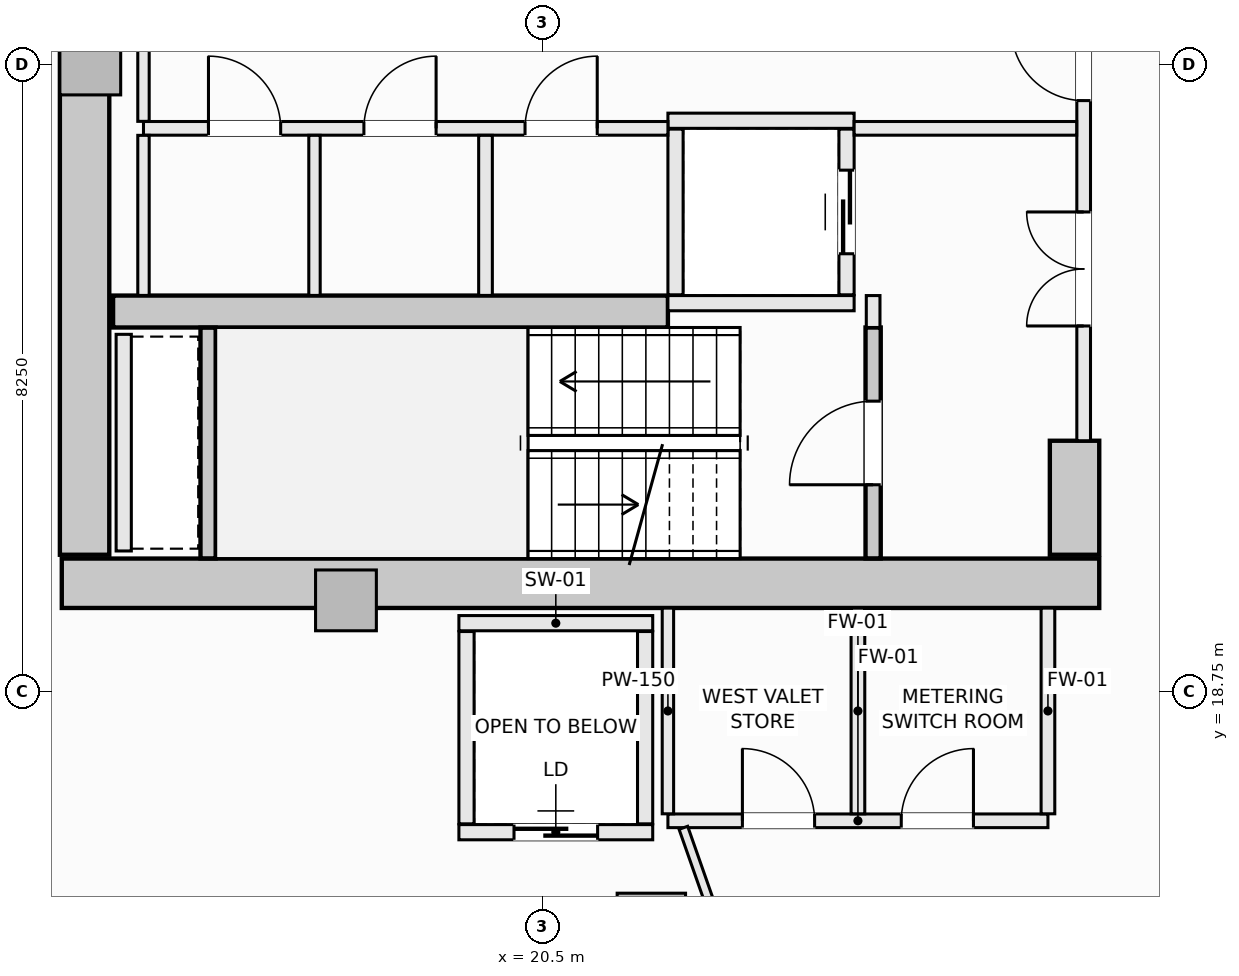
"""IFC4 building model, lengths in metres.
Left out: names, types, materials, properties, quantities, classifications, styles, units other than length and angle.
Written with IfcOpenShell. Run it as: python <this file> out.ifc"""

import sys

from ifc_helpers import new_model, si_unit, direction, frame, frame_2d, origin, origin_2d, place, context, subcontext, project, spatial, rectangle, extrude, element, fill, save


model = new_model("IFC4")
c1 = context("Model", 3, precision=1e-05, world=origin(), true_north=direction((0.0, 1.0)))
c2 = subcontext(c1, "Body", "Model", "MODEL_VIEW")
j1 = project(units=[si_unit("LENGTHUNIT", "METRE"), si_unit("PLANEANGLEUNIT", "RADIAN")], contexts=[c1])
p1 = place(None, origin())
s1 = spatial("IfcSite", under=j1, at=p1, CompositionType="ELEMENT")
p2 = place(p1, origin())
s2 = spatial("IfcBuilding", under=s1, at=p2, CompositionType="ELEMENT")
p3 = place(p2, frame((0.0, 0.0, 139.3)))
s3 = spatial("IfcBuildingStorey", under=s2, at=p3, CompositionType="ELEMENT", Elevation=139.3)
p4 = place(p3, frame((14.175, 20.175, -0.27), z_axis=(0.0, 0.0, 1.0), x_axis=(1.0, 0.0, 0.0)))
e1 = element("IfcWall", 1, at=p4, inside=s3, PredefinedType="SHEAR", context=c2, shape_type="SweptSolid", body=[
    extrude(rectangle(XDim=13.65, YDim=0.65, at=frame_2d((6.825, 0.0))), origin(), (0.0, 0.0, 1.0), 3.4),
])
p5 = place(p3, frame((14.475, 20.55, -0.27), z_axis=(0.0, 0.0, 1.0), x_axis=(0.0, 1.0, 0.0)))
e2 = element("IfcWall", 2, at=p5, inside=s3, PredefinedType="SHEAR", context=c2, shape_type="SweptSolid", body=[
    extrude(rectangle(XDim=12.9, YDim=0.65, at=frame_2d((6.45, 0.0))), origin(), (0.0, 0.0, 1.0), 3.4),
])
p6 = place(p3, frame((27.5, 20.55, -0.27), z_axis=(0.0, 0.0, 1.0), x_axis=(0.0, 1.0, 0.0)))
e3 = element("IfcWall", 3, at=p6, inside=s3, PredefinedType="SHEAR", context=c2, shape_type="SweptSolid", body=[
    extrude(rectangle(XDim=1.5, YDim=0.65, at=frame_2d((0.75, 0.0))), origin(), (0.0, 0.0, 1.0), 3.4),
])
p7 = place(p3, frame((14.85, 23.75, -0.27), z_axis=(0.0, 0.0, 1.0), x_axis=(1.0, 0.0, 0.0)))
e4 = element("IfcWall", 4, at=p7, inside=s3, PredefinedType="SHEAR", context=c2, shape_type="SweptSolid", body=[
    extrude(rectangle(XDim=7.3, YDim=0.42, at=frame_2d((3.65, 0.0))), origin(), (0.0, 0.0, 1.0), 3.4),
])
p8 = place(p3, frame((21.932, 15.648, -0.27), z_axis=(0.0, 0.0, 1.0), x_axis=(1.0, 0.0, 0.0)))
e5 = element("IfcColumn", 5, at=p8, inside=s3, PredefinedType="COLUMN", context=c2, shape_type="SweptSolid", body=[
    extrude(rectangle(XDim=0.9, YDim=0.9, at=origin_2d()), origin(), (0.0, 0.0, 1.0), 3.4),
])
for number, where, z_axis, x_axis in (
    (6, (14.55, 27.0, -0.27), (0.0, 0.0, 1.0), (1.0, 0.0, 0.0)),
    (7, (17.914, 19.95, -0.27), (0.0, 0.0, 1.0), (1.0, 0.0, 0.0)),
):
    element("IfcColumn", number, at=place(p3, frame(where, z_axis=z_axis, x_axis=x_axis)), inside=s3, PredefinedType="PILASTER", context=c2, shape_type="SweptSolid", body=[
        extrude(rectangle(XDim=0.8, YDim=0.8, at=origin_2d()), origin(), (0.0, 0.0, 1.0), 3.4),
    ])
p9 = place(p3, frame((9.178, 17.325, 0.0), z_axis=(0.0, 0.0, 1.0), x_axis=(0.901370184739, -0.433049408339, 0.0)))
e8 = element("IfcWall", 8, at=p9, inside=s3, PredefinedType="SOLIDWALL", context=c2, shape_type="SweptSolid", body=[
    extrude(rectangle(XDim=5.884, YDim=0.3, at=frame_2d((2.942, 0.0))), origin(), (0.0, 0.0, 1.0), 2.653),
])
p10 = place(p9, frame((1.892, 0.0, 0.74)))
e9 = element("IfcOpeningElement", 9, at=p10, cuts=e8, PredefinedType="OPENING", context=c2, shape_type="SweptSolid", body=[
    extrude(rectangle(XDim=2.1, YDim=1.7, at=frame_2d((1.05, 0.85))), frame((0.0, 0.16, 0.0), z_axis=(0.0, -1.0, 0.0), x_axis=(1.0, 0.0, 0.0)), (0.0, 0.0, 1.0), 0.32),
])
p11 = place(p3, frame((24.85, 20.502, -0.27), z_axis=(0.0, 0.0, 1.0), x_axis=(0.0, 1.0, 0.0)))
e10 = element("IfcWall", 10, at=p11, inside=s3, PredefinedType="SHEAR", context=c2, shape_type="SweptSolid", body=[
    extrude(rectangle(XDim=3.038, YDim=0.2, at=frame_2d((1.519, 0.0))), origin(), (0.0, 0.0, 1.0), 3.4),
])
p12 = place(p11, frame((0.969, 0.0, 0.27)))
e11 = element("IfcOpeningElement", 11, at=p12, cuts=e10, PredefinedType="OPENING", context=c2, shape_type="SweptSolid", body=[
    extrude(rectangle(XDim=1.1, YDim=2.15, at=frame_2d((0.55, 1.075))), frame((0.0, 0.11, 0.0), z_axis=(0.0, -1.0, 0.0), x_axis=(1.0, 0.0, 0.0)), (0.0, 0.0, 1.0), 0.22),
])
p13 = place(p3, frame((16.1, 20.502, -0.27), z_axis=(0.0, 0.0, 1.0), x_axis=(0.0, 1.0, 0.0)))
e12 = element("IfcWall", 12, at=p13, inside=s3, PredefinedType="SHEAR", context=c2, shape_type="SweptSolid", body=[
    extrude(rectangle(XDim=3.036, YDim=0.2, at=frame_2d((1.518, 0.0))), origin(), (0.0, 0.0, 1.0), 3.4),
])
for number, where, z_axis, x_axis in (
    (13, (22.15, 26.26, 0.0), (0.0, 0.0, 1.0), (1.0, 0.0, 0.0)),
    (14, (22.15, 23.86, 0.0), (0.0, 0.0, 1.0), (1.0, 0.0, 0.0)),
):
    element("IfcWall", number, at=place(p3, frame(where, z_axis=z_axis, x_axis=x_axis)), inside=s3, PredefinedType="SOLIDWALL", context=c2, shape_type="SweptSolid", body=[
        extrude(rectangle(XDim=2.45, YDim=0.2, at=frame_2d((1.225, 0.0))), origin(), (0.0, 0.0, 1.0), 3.13),
    ])
p14 = place(p3, frame((22.25, 23.97, 0.0), z_axis=(0.0, 0.0, 1.0), x_axis=(0.0, 1.0, 0.0)))
e15 = element("IfcWall", 15, at=p14, inside=s3, PredefinedType="SOLIDWALL", context=c2, shape_type="SweptSolid", body=[
    extrude(rectangle(XDim=2.18, YDim=0.2, at=frame_2d((1.09, 0.0))), origin(), (0.0, 0.0, 1.0), 3.13),
])
p15 = place(p3, frame((24.5, 23.97, 0.0), z_axis=(0.0, 0.0, 1.0), x_axis=(0.0, 1.0, 0.0)))
e16 = element("IfcWall", 16, at=p15, inside=s3, PredefinedType="SOLIDWALL", context=c2, shape_type="SweptSolid", body=[
    extrude(rectangle(XDim=2.18, YDim=0.2, at=frame_2d((1.09, 0.0))), origin(), (0.0, 0.0, 1.0), 3.13),
])
p16 = place(p15, frame((0.54, 0.0, 0.0)))
e17 = element("IfcOpeningElement", 17, at=p16, cuts=e16, PredefinedType="OPENING", context=c2, shape_type="SweptSolid", body=[
    extrude(rectangle(XDim=1.1, YDim=2.2, at=frame_2d((0.55, 1.1))), frame((0.0, 0.11, 0.0), z_axis=(0.0, -1.0, 0.0), x_axis=(1.0, 0.0, 0.0)), (0.0, 0.0, 1.0), 0.22),
])
p17 = place(p3, frame((19.4, 19.65, 0.0), z_axis=(0.0, 0.0, 1.0), x_axis=(1.0, 0.0, 0.0)))
e18 = element("IfcWall", 18, at=p17, inside=s3, PredefinedType="SOLIDWALL", context=c2, shape_type="SweptSolid", body=[
    extrude(rectangle(XDim=2.55, YDim=0.2, at=frame_2d((1.275, 0.0))), origin(), (0.0, 0.0, 1.0), 3.13),
])
p18 = place(p3, frame((19.4, 16.9, 0.0), z_axis=(0.0, 0.0, 1.0), x_axis=(1.0, 0.0, 0.0)))
e19 = element("IfcWall", 19, at=p18, inside=s3, PredefinedType="SOLIDWALL", context=c2, shape_type="SweptSolid", body=[
    extrude(rectangle(XDim=2.55, YDim=0.2, at=frame_2d((1.275, 0.0))), origin(), (0.0, 0.0, 1.0), 3.13),
])
p19 = place(p18, frame((0.725, 0.0, 0.0)))
e20 = element("IfcOpeningElement", 20, at=p19, cuts=e19, PredefinedType="OPENING", context=c2, shape_type="SweptSolid", body=[
    extrude(rectangle(XDim=1.1, YDim=2.2, at=frame_2d((0.55, 1.1))), frame((0.0, 0.11, 0.0), z_axis=(0.0, -1.0, 0.0), x_axis=(1.0, 0.0, 0.0)), (0.0, 0.0, 1.0), 0.22),
])
for number, where, z_axis, x_axis in (
    (21, (19.5, 17.01, 0.0), (0.0, 0.0, 1.0), (0.0, 1.0, 0.0)),
    (22, (21.85, 17.01, 0.0), (0.0, 0.0, 1.0), (0.0, 1.0, 0.0)),
):
    element("IfcWall", number, at=place(p3, frame(where, z_axis=z_axis, x_axis=x_axis)), inside=s3, PredefinedType="SOLIDWALL", context=c2, shape_type="SweptSolid", body=[
        extrude(rectangle(XDim=2.53, YDim=0.2, at=frame_2d((1.265, 0.0))), origin(), (0.0, 0.0, 1.0), 3.13),
    ])
p20 = place(p3, frame((14.99, 20.6, 0.0), z_axis=(0.0, 0.0, 1.0), x_axis=(0.0, 1.0, 0.0)))
e23 = element("IfcWall", 23, at=p20, inside=s3, PredefinedType="SOLIDWALL", context=c2, shape_type="SweptSolid", body=[
    extrude(rectangle(XDim=2.85, YDim=0.2, at=frame_2d((1.425, 0.0))), origin(), (0.0, 0.0, 1.0), 3.13),
])
p21 = place(p3, frame((24.85, 23.54, 0.0), z_axis=(0.0, 0.0, 1.0), x_axis=(0.0, 1.0, 0.0)))
e24 = element("IfcWall", 24, at=p21, inside=s3, PredefinedType="SOLIDWALL", context=c2, shape_type="SweptSolid", body=[
    extrude(rectangle(XDim=0.42, YDim=0.18, at=frame_2d((0.21, 0.0))), origin(), (0.0, 0.0, 1.0), 3.13),
])
p22 = place(p3, frame((27.62, 22.05, 0.0), z_axis=(0.0, 0.0, 1.0), x_axis=(0.0, 1.0, 0.0)))
e25 = element("IfcWall", 25, at=p22, inside=s3, PredefinedType="SOLIDWALL", context=c2, shape_type="SweptSolid", body=[
    extrude(rectangle(XDim=9.9, YDim=0.18, at=frame_2d((4.95, 0.0))), origin(), (0.0, 0.0, 1.0), 3.13),
])
p23 = place(p22, frame((4.475, 0.0, 0.0)))
e26 = element("IfcOpeningElement", 26, at=p23, cuts=e25, PredefinedType="OPENING", context=c2, shape_type="SweptSolid", body=[
    extrude(rectangle(XDim=0.95, YDim=2.1, at=frame_2d((0.475, 1.05))), frame((0.0, 0.1, 0.0), z_axis=(0.0, -1.0, 0.0), x_axis=(1.0, 0.0, 0.0)), (0.0, 0.0, 1.0), 0.2),
])
p24 = place(p22, frame((6.89, 0.0, 0.0)))
e27 = element("IfcOpeningElement", 27, at=p24, cuts=e25, PredefinedType="OPENING", context=c2, shape_type="SweptSolid", body=[
    extrude(rectangle(XDim=1.5, YDim=2.2, at=frame_2d((0.75, 1.1))), frame((0.0, 0.1, 0.0), z_axis=(0.0, -1.0, 0.0), x_axis=(1.0, 0.0, 0.0)), (0.0, 0.0, 1.0), 0.2),
])
p25 = place(p22, frame((1.51, 0.0, 0.0)))
e28 = element("IfcOpeningElement", 28, at=p25, cuts=e25, PredefinedType="OPENING", context=c2, shape_type="SweptSolid", body=[
    extrude(rectangle(XDim=1.5, YDim=2.2, at=frame_2d((0.75, 1.1))), frame((0.0, 0.1, 0.0), z_axis=(0.0, -1.0, 0.0), x_axis=(1.0, 0.0, 0.0)), (0.0, 0.0, 1.0), 0.2),
])
p26 = place(p3, frame((15.25, 26.16, 0.0), z_axis=(0.0, 0.0, 1.0), x_axis=(1.0, 0.0, 0.0)))
e29 = element("IfcWall", 29, at=p26, inside=s3, PredefinedType="SOLIDWALL", context=c2, shape_type="SweptSolid", body=[
    extrude(rectangle(XDim=6.9, YDim=0.18, at=frame_2d((3.45, 0.0))), origin(), (0.0, 0.0, 1.0), 3.13),
])
p27 = place(p26, frame((5.02, 0.0, 0.0)))
e30 = element("IfcOpeningElement", 30, at=p27, cuts=e29, PredefinedType="OPENING", context=c2, shape_type="SweptSolid", body=[
    extrude(rectangle(XDim=0.95, YDim=2.1, at=frame_2d((0.475, 1.05))), frame((0.0, 0.1, 0.0), z_axis=(0.0, -1.0, 0.0), x_axis=(1.0, 0.0, 0.0)), (0.0, 0.0, 1.0), 0.2),
])
p28 = place(p26, frame((0.855, 0.0, 0.0)))
e31 = element("IfcOpeningElement", 31, at=p28, cuts=e29, PredefinedType="OPENING", context=c2, shape_type="SweptSolid", body=[
    extrude(rectangle(XDim=0.95, YDim=2.1, at=frame_2d((0.475, 1.05))), frame((0.0, 0.1, 0.0), z_axis=(0.0, -1.0, 0.0), x_axis=(1.0, 0.0, 0.0)), (0.0, 0.0, 1.0), 0.2),
])
p29 = place(p26, frame((2.9, 0.0, 0.0)))
e32 = element("IfcOpeningElement", 32, at=p29, cuts=e29, PredefinedType="OPENING", context=c2, shape_type="SweptSolid", body=[
    extrude(rectangle(XDim=0.95, YDim=2.1, at=frame_2d((0.475, 1.05))), frame((0.0, 0.1, 0.0), z_axis=(0.0, -1.0, 0.0), x_axis=(1.0, 0.0, 0.0)), (0.0, 0.0, 1.0), 0.2),
])
p30 = place(p3, frame((24.6, 26.16, 0.0), z_axis=(0.0, 0.0, 1.0), x_axis=(1.0, 0.0, 0.0)))
e33 = element("IfcWall", 33, at=p30, inside=s3, PredefinedType="SOLIDWALL", context=c2, shape_type="SweptSolid", body=[
    extrude(rectangle(XDim=2.928, YDim=0.18, at=frame_2d((1.464, 0.0))), origin(), (0.0, 0.0, 1.0), 3.13),
])
p31 = place(p3, frame((15.25, 23.962, 0.0), z_axis=(0.0, 0.0, 1.0), x_axis=(0.0, 1.0, 0.0)))
e34 = element("IfcWall", 34, at=p31, inside=s3, PredefinedType="PARTITIONING", context=c2, shape_type="SweptSolid", body=[
    extrude(rectangle(XDim=2.106, YDim=0.15, at=frame_2d((1.053, 0.0))), origin(), (0.0, 0.0, 1.0), 3.13),
])
p32 = place(p3, frame((15.25, 26.252, 0.0), z_axis=(0.0, 0.0, 1.0), x_axis=(0.0, 1.0, 0.0)))
e35 = element("IfcWall", 35, at=p32, inside=s3, PredefinedType="PARTITIONING", context=c2, shape_type="SweptSolid", body=[
    extrude(rectangle(XDim=1.496, YDim=0.15, at=frame_2d((0.748, 0.0))), origin(), (0.0, 0.0, 1.0), 3.13),
])
p33 = place(p3, frame((19.75, 23.962, 0.0), z_axis=(0.0, 0.0, 1.0), x_axis=(0.0, 1.0, 0.0)))
e36 = element("IfcWall", 36, at=p33, inside=s3, PredefinedType="SOLIDWALL", context=c2, shape_type="SweptSolid", body=[
    extrude(rectangle(XDim=2.106, YDim=0.18, at=frame_2d((1.053, 0.0))), origin(), (0.0, 0.0, 1.0), 3.13),
])
p34 = place(p3, frame((17.5, 23.962, 0.0), z_axis=(0.0, 0.0, 1.0), x_axis=(0.0, 1.0, 0.0)))
e37 = element("IfcWall", 37, at=p34, inside=s3, PredefinedType="PARTITIONING", context=c2, shape_type="SweptSolid", body=[
    extrude(rectangle(XDim=2.106, YDim=0.15, at=frame_2d((1.053, 0.0))), origin(), (0.0, 0.0, 1.0), 3.13),
])
p35 = place(p3, frame((22.15, 17.05, 0.0), z_axis=(0.0, 0.0, 1.0), x_axis=(1.0, 0.0, 0.0)))
e38 = element("IfcWall", 38, at=p35, inside=s3, PredefinedType="SOLIDWALL", context=c2, shape_type="SweptSolid", body=[
    extrude(rectangle(XDim=5.0, YDim=0.18, at=frame_2d((2.5, 0.0))), origin(), (0.0, 0.0, 1.0), 3.13),
])
p36 = place(p35, frame((0.98, 0.0, 0.0)))
e39 = element("IfcOpeningElement", 39, at=p36, cuts=e38, PredefinedType="OPENING", context=c2, shape_type="SweptSolid", body=[
    extrude(rectangle(XDim=0.95, YDim=2.1, at=frame_2d((0.475, 1.05))), frame((0.0, 0.1, 0.0), z_axis=(0.0, -1.0, 0.0), x_axis=(1.0, 0.0, 0.0)), (0.0, 0.0, 1.0), 0.2),
])
p37 = place(p35, frame((3.07, 0.0, 0.0)))
e40 = element("IfcOpeningElement", 40, at=p37, cuts=e38, PredefinedType="OPENING", context=c2, shape_type="SweptSolid", body=[
    extrude(rectangle(XDim=0.95, YDim=2.1, at=frame_2d((0.475, 1.05))), frame((0.0, 0.1, 0.0), z_axis=(0.0, -1.0, 0.0), x_axis=(1.0, 0.0, 0.0)), (0.0, 0.0, 1.0), 0.2),
])
p38 = place(p3, frame((22.15, 17.142, 0.0), z_axis=(0.0, 0.0, 1.0), x_axis=(0.0, 1.0, 0.0)))
e41 = element("IfcWall", 41, at=p38, inside=s3, PredefinedType="PARTITIONING", context=c2, shape_type="SweptSolid", body=[
    extrude(rectangle(XDim=2.706, YDim=0.15, at=frame_2d((1.353, 0.0))), origin(), (0.0, 0.0, 1.0), 3.13),
])
for number, where, z_axis, x_axis in (
    (42, (24.65, 17.142, 0.0), (0.0, 0.0, 1.0), (0.0, 1.0, 0.0)),
    (43, (27.15, 17.142, 0.0), (0.0, 0.0, 1.0), (0.0, 1.0, 0.0)),
):
    element("IfcWall", number, at=place(p3, frame(where, z_axis=z_axis, x_axis=x_axis)), inside=s3, PredefinedType="SOLIDWALL", context=c2, shape_type="SweptSolid", body=[
        extrude(rectangle(XDim=2.706, YDim=0.18, at=frame_2d((1.353, 0.0))), origin(), (0.0, 0.0, 1.0), 3.13),
    ])
p39 = place(p3, frame((22.353, 16.958, 0.0), z_axis=(0.0, 0.0, 1.0), x_axis=(0.331370038458, -0.943500873138, 0.0)))
e44 = element("IfcWall", 44, at=p39, inside=s3, PredefinedType="PARTITIONING", context=c2, shape_type="SweptSolid", body=[
    extrude(rectangle(XDim=1.216, YDim=0.12, at=frame_2d((0.608, 0.0))), origin(), (0.0, 0.0, 1.0), 3.13),
])
p40 = place(p12, origin())
e45 = element("IfcDoor", 45, at=p40, inside=s3, OperationType="SINGLE_SWING_LEFT", PredefinedType="DOOR", context=c2, shape_type="SweptSolid", body=[
    extrude(rectangle(XDim=1.1, YDim=2.15, at=frame_2d((0.55, 1.075))), frame((0.0, 0.025, 0.0), z_axis=(0.0, -1.0, 0.0), x_axis=(1.0, 0.0, 0.0)), (0.0, 0.0, 1.0), 0.05),
])
fill(e11, e45)
p41 = place(p16, origin())
e46 = element("IfcDoor", 46, at=p41, inside=s3, OperationType="SLIDING_TO_LEFT", PredefinedType="DOOR", context=c2, shape_type="SweptSolid", body=[
    extrude(rectangle(XDim=1.1, YDim=2.2, at=frame_2d((0.55, 1.1))), frame((0.0, 0.025, 0.0), z_axis=(0.0, -1.0, 0.0), x_axis=(1.0, 0.0, 0.0)), (0.0, 0.0, 1.0), 0.05),
])
fill(e17, e46)
p42 = place(p19, origin())
e47 = element("IfcDoor", 47, at=p42, inside=s3, OperationType="SLIDING_TO_LEFT", PredefinedType="DOOR", context=c2, shape_type="SweptSolid", body=[
    extrude(rectangle(XDim=1.1, YDim=2.2, at=frame_2d((0.55, 1.1))), frame((0.0, 0.025, 0.0), z_axis=(0.0, -1.0, 0.0), x_axis=(1.0, 0.0, 0.0)), (0.0, 0.0, 1.0), 0.05),
])
fill(e20, e47)
p43 = place(p23, origin())
e48 = element("IfcDoor", 48, at=p43, inside=s3, OperationType="SINGLE_SWING_RIGHT", PredefinedType="DOOR", context=c2, shape_type="SweptSolid", body=[
    extrude(rectangle(XDim=0.95, YDim=2.1, at=frame_2d((0.475, 1.05))), frame((0.0, 0.025, 0.0), z_axis=(0.0, -1.0, 0.0), x_axis=(1.0, 0.0, 0.0)), (0.0, 0.0, 1.0), 0.05),
])
fill(e26, e48)
p44 = place(p25, origin())
e49 = element("IfcDoor", 49, at=p44, inside=s3, OperationType="DOUBLE_DOOR_SINGLE_SWING", PredefinedType="DOOR", context=c2, shape_type="SweptSolid", body=[
    extrude(rectangle(XDim=1.5, YDim=2.2, at=frame_2d((0.75, 1.1))), frame((0.0, 0.025, 0.0), z_axis=(0.0, -1.0, 0.0), x_axis=(1.0, 0.0, 0.0)), (0.0, 0.0, 1.0), 0.05),
])
fill(e28, e49)
p45 = place(p27, origin())
e50 = element("IfcDoor", 50, at=p45, inside=s3, OperationType="SINGLE_SWING_RIGHT", PredefinedType="DOOR", context=c2, shape_type="SweptSolid", body=[
    extrude(rectangle(XDim=0.95, YDim=2.1, at=frame_2d((0.475, 1.05))), frame((0.0, 0.025, 0.0), z_axis=(0.0, -1.0, 0.0), x_axis=(1.0, 0.0, 0.0)), (0.0, 0.0, 1.0), 0.05),
])
fill(e30, e50)
p46 = place(p28, origin())
e51 = element("IfcDoor", 51, at=p46, inside=s3, OperationType="SINGLE_SWING_LEFT", PredefinedType="DOOR", context=c2, shape_type="SweptSolid", body=[
    extrude(rectangle(XDim=0.95, YDim=2.1, at=frame_2d((0.475, 1.05))), frame((0.0, 0.025, 0.0), z_axis=(0.0, -1.0, 0.0), x_axis=(1.0, 0.0, 0.0)), (0.0, 0.0, 1.0), 0.05),
])
fill(e31, e51)
p47 = place(p29, origin())
e52 = element("IfcDoor", 52, at=p47, inside=s3, OperationType="SINGLE_SWING_RIGHT", PredefinedType="DOOR", context=c2, shape_type="SweptSolid", body=[
    extrude(rectangle(XDim=0.95, YDim=2.1, at=frame_2d((0.475, 1.05))), frame((0.0, 0.025, 0.0), z_axis=(0.0, -1.0, 0.0), x_axis=(1.0, 0.0, 0.0)), (0.0, 0.0, 1.0), 0.05),
])
fill(e32, e52)
p48 = place(p36, origin())
e53 = element("IfcDoor", 53, at=p48, inside=s3, OperationType="SINGLE_SWING_LEFT", PredefinedType="DOOR", context=c2, shape_type="SweptSolid", body=[
    extrude(rectangle(XDim=0.95, YDim=2.1, at=frame_2d((0.475, 1.05))), frame((0.0, 0.025, 0.0), z_axis=(0.0, -1.0, 0.0), x_axis=(1.0, 0.0, 0.0)), (0.0, 0.0, 1.0), 0.05),
])
fill(e39, e53)
p49 = place(p37, origin())
e54 = element("IfcDoor", 54, at=p49, inside=s3, OperationType="SINGLE_SWING_RIGHT", PredefinedType="DOOR", context=c2, shape_type="SweptSolid", body=[
    extrude(rectangle(XDim=0.95, YDim=2.1, at=frame_2d((0.475, 1.05))), frame((0.0, 0.025, 0.0), z_axis=(0.0, -1.0, 0.0), x_axis=(1.0, 0.0, 0.0)), (0.0, 0.0, 1.0), 0.05),
])
fill(e40, e54)
save(model, sys.argv[1])
